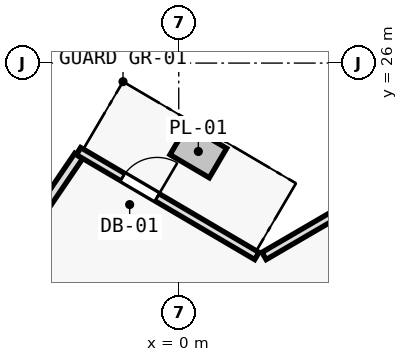
"""IFC4 building model, lengths in metres.
Left out: names, types, materials, properties, quantities, classifications, styles, units other than length and angle.
Written with IfcOpenShell. Run it as: python <this file> out.ifc"""

import sys

from ifc_helpers import new_model, si_unit, direction, frame, frame_2d, origin, place, context, subcontext, project, spatial, rectangle, extrude, element, fill, save


model = new_model("IFC4")
c1 = context("Model", 3, precision=1e-05, world=origin(), true_north=direction((0.0, 1.0)))
c2 = subcontext(c1, "Body", "Model", "MODEL_VIEW")
j1 = project(units=[si_unit("LENGTHUNIT", "METRE"), si_unit("PLANEANGLEUNIT", "RADIAN")], contexts=[c1])
p1 = place(None, origin())
s1 = spatial("IfcSite", under=j1, at=p1, CompositionType="ELEMENT")
p2 = place(p1, origin())
s2 = spatial("IfcBuilding", under=s1, at=p2, CompositionType="ELEMENT")
p3 = place(p2, frame((0.0, 0.0, 37.2)))
s3 = spatial("IfcBuildingStorey", under=s2, at=p3, CompositionType="ELEMENT", Elevation=37.2)
p4 = place(p3, frame((-9.684, 13.191, 0.0), z_axis=(0.0, 0.0, 1.0), x_axis=(0.562473549685, 0.826815279192, 0.0)))
e1 = element("IfcWall", 1, at=p4, inside=s3, PredefinedType="SOLIDWALL", context=c2, shape_type="SweptSolid", body=[
    extrude(rectangle(XDim=12.536, YDim=0.25, at=frame_2d((6.268, 0.0))), origin(), (0.0, 0.0, 1.0), 3.35),
])
p5 = place(p4, frame((5.668, 0.0, 0.62)))
e2 = element("IfcOpeningElement", 2, at=p5, cuts=e1, PredefinedType="OPENING", context=c2, shape_type="SweptSolid", body=[
    extrude(rectangle(XDim=1.2, YDim=1.8, at=frame_2d((0.6, 0.9))), frame((0.0, 0.135, 0.0), z_axis=(0.0, -1.0, 0.0), x_axis=(1.0, 0.0, 0.0)), (0.0, 0.0, 1.0), 0.27),
])
p6 = place(p3, frame((2.245, 20.925, 0.0), z_axis=(0.0, 0.0, 1.0), x_axis=(0.863967641515, 0.503547330858, 0.0)))
e3 = element("IfcWall", 3, at=p6, inside=s3, PredefinedType="SOLIDWALL", context=c2, shape_type="SweptSolid", body=[
    extrude(rectangle(XDim=4.925, YDim=0.22, at=frame_2d((2.462, 0.0))), origin(), (0.0, 0.0, 1.0), 3.35),
])
p7 = place(p3, frame((-2.635, 23.681, 0.0), z_axis=(0.0, 0.0, 1.0), x_axis=(0.862126841454, -0.506692519428, 0.0)))
e4 = element("IfcWall", 4, at=p7, inside=s3, PredefinedType="SOLIDWALL", context=c2, shape_type="SweptSolid", body=[
    extrude(rectangle(XDim=5.439, YDim=0.22, at=frame_2d((2.72, 0.0))), origin(), (0.0, 0.0, 1.0), 3.35),
])
p8 = place(p7, frame((1.345, 0.0, 0.0)))
e5 = element("IfcOpeningElement", 5, at=p8, cuts=e4, PredefinedType="OPENING", context=c2, shape_type="SweptSolid", body=[
    extrude(rectangle(XDim=1.05, YDim=2.15, at=frame_2d((0.525, 1.075))), frame((0.0, 0.12, 0.0), z_axis=(0.0, -1.0, 0.0), x_axis=(1.0, 0.0, 0.0)), (0.0, 0.0, 1.0), 0.24),
])
p9 = place(p8, origin())
e6 = element("IfcDoor", 6, at=p9, inside=s3, OperationType="SINGLE_SWING_RIGHT", PredefinedType="DOOR", context=c2, shape_type="SweptSolid", body=[
    extrude(rectangle(XDim=1.05, YDim=2.15, at=frame_2d((0.525, 1.075))), frame((0.0, 0.025, 0.0), z_axis=(0.0, -1.0, 0.0), x_axis=(1.0, 0.0, 0.0)), (0.0, 0.0, 1.0), 0.05),
])
fill(e5, e6)
save(model, sys.argv[1])
